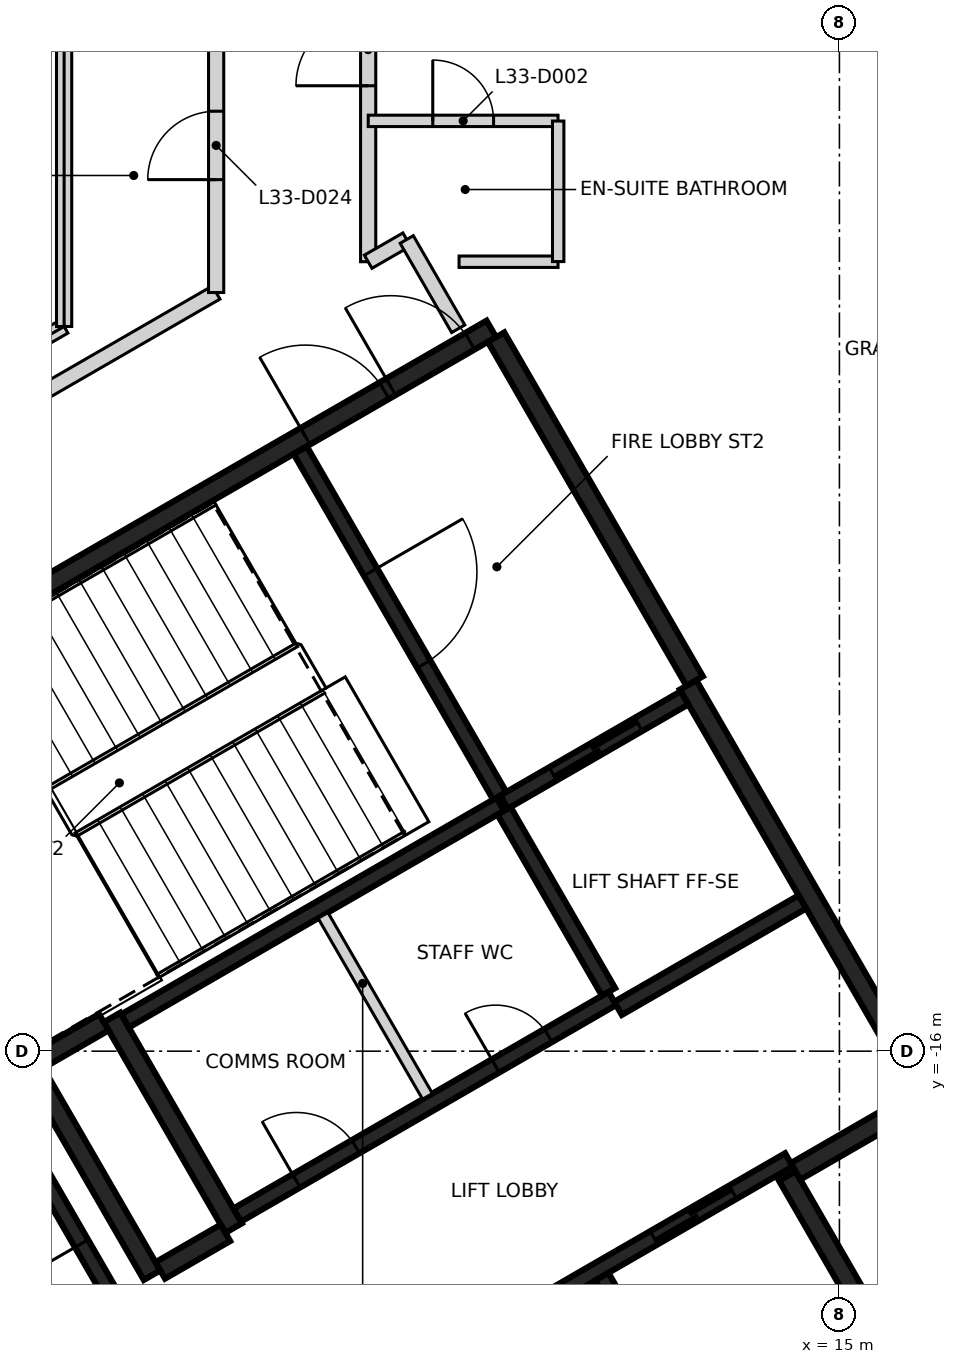
"""IFC4 building model, lengths in metres.
Left out: names, types, materials, properties, quantities, classifications, styles, units other than length and angle.
Written with IfcOpenShell. Run it as: python <this file> out.ifc"""

import sys

from ifc_helpers import new_model, si_unit, direction, frame, frame_2d, origin, place, context, subcontext, project, spatial, rectangle, extrude, element, fill, save


model = new_model("IFC4")
c1 = context("Model", 3, precision=1e-05, world=origin(), true_north=direction((0.0, 1.0)))
c2 = subcontext(c1, "Body", "Model", "MODEL_VIEW")
j1 = project(units=[si_unit("LENGTHUNIT", "METRE"), si_unit("PLANEANGLEUNIT", "RADIAN")], contexts=[c1])
p1 = place(None, origin())
s1 = spatial("IfcSite", under=j1, at=p1, CompositionType="ELEMENT")
p2 = place(p1, origin())
s2 = spatial("IfcBuilding", under=s1, at=p2, CompositionType="ELEMENT")
p3 = place(p2, frame((0.0, 0.0, 136.0)))
s3 = spatial("IfcBuildingStorey", under=s2, at=p3, CompositionType="ELEMENT", Elevation=136.0)
p4 = place(p3, frame((0.417, -12.273, 0.0), z_axis=(0.0, 0.0, 1.0), x_axis=(0.866021906294, 0.500006057782, 0.0)))
e1 = element("IfcWall", 1, at=p4, inside=s3, PredefinedType="SHEAR", context=c2, shape_type="SweptSolid", body=[
    extrude(rectangle(XDim=11.55, YDim=0.25, at=frame_2d((5.775, 0.0))), origin(), (0.0, 0.0, 1.0), 3.2),
])
p5 = place(p4, frame((10.025, 0.0, 0.0)))
e2 = element("IfcOpeningElement", 2, at=p5, cuts=e1, PredefinedType="OPENING", context=c2, shape_type="SweptSolid", body=[
    extrude(rectangle(XDim=1.2, YDim=2.1, at=frame_2d((0.6, 1.05))), frame((0.0, 0.135, 0.0), z_axis=(0.0, -1.0, 0.0), x_axis=(1.0, 0.0, 0.0)), (0.0, 0.0, 1.0), 0.27),
])
p6 = place(p4, frame((8.725, 0.0, 0.0)))
e3 = element("IfcOpeningElement", 3, at=p6, cuts=e1, PredefinedType="OPENING", context=c2, shape_type="SweptSolid", body=[
    extrude(rectangle(XDim=1.2, YDim=2.1, at=frame_2d((0.6, 1.05))), frame((0.0, 0.135, 0.0), z_axis=(0.0, -1.0, 0.0), x_axis=(1.0, 0.0, 0.0)), (0.0, 0.0, 1.0), 0.27),
])
p7 = place(p3, frame((13.008, -11.181, 0.0), z_axis=(0.0, 0.0, 1.0), x_axis=(0.500004234368, -0.866022959057, 0.0)))
e4 = element("IfcWall", 4, at=p7, inside=s3, PredefinedType="SHEAR", context=c2, shape_type="SweptSolid", body=[
    extrude(rectangle(XDim=6.25, YDim=0.25, at=frame_2d((3.125, 0.0))), origin(), (0.0, 0.0, 1.0), 3.2),
])
p8 = place(p3, frame((10.483, -6.606, 0.0), z_axis=(0.0, 0.0, 1.0), x_axis=(0.49999885962, -0.866026062182, 0.0)))
e5 = element("IfcWall", 5, at=p8, inside=s3, PredefinedType="SHEAR", context=c2, shape_type="SweptSolid", body=[
    extrude(rectangle(XDim=5.225, YDim=0.25, at=frame_2d((2.612, 0.0))), origin(), (0.0, 0.0, 1.0), 3.2),
])
p9 = place(p3, frame((7.031, -18.327, 0.0), z_axis=(0.0, 0.0, 1.0), x_axis=(-0.499971222258, 0.866042017984, 0.0)))
e6 = element("IfcWall", 6, at=p9, inside=s3, PredefinedType="SHEAR", context=c2, shape_type="SweptSolid", body=[
    extrude(rectangle(XDim=3.2, YDim=0.25, at=frame_2d((1.6, 0.0))), origin(), (0.0, 0.0, 1.0), 3.2),
])
p10 = place(p3, frame((14.315, -17.644, 0.0), z_axis=(0.0, 0.0, 1.0), x_axis=(0.500023226632, -0.866011993467, 0.0)))
e7 = element("IfcWall", 7, at=p10, inside=s3, PredefinedType="SHEAR", context=c2, shape_type="SweptSolid", body=[
    extrude(rectangle(XDim=2.974, YDim=0.25, at=frame_2d((1.487, 0.0))), origin(), (0.0, 0.0, 1.0), 3.2),
])
p11 = place(p3, frame((4.414, -16.276, 0.0), z_axis=(0.0, 0.0, 1.0), x_axis=(0.500003324108, -0.866023484601, 0.0)))
e8 = element("IfcWall", 8, at=p11, inside=s3, PredefinedType="SHEAR", context=c2, shape_type="SweptSolid", body=[
    extrude(rectangle(XDim=3.085, YDim=0.25, at=frame_2d((1.542, 0.0))), origin(), (0.0, 0.0, 1.0), 3.2),
])
p12 = place(p3, frame((5.322, -15.619, 0.0), z_axis=(0.0, 0.0, 1.0), x_axis=(-0.866026229868, -0.499998569178, 0.0)))
e9 = element("IfcWall", 9, at=p12, inside=s3, PredefinedType="SHEAR", context=c2, shape_type="SweptSolid", body=[
    extrude(rectangle(XDim=2.449, YDim=0.25, at=frame_2d((1.225, 0.0))), origin(), (0.0, 0.0, 1.0), 3.2),
])
p13 = place(p3, frame((16.025, -16.656, 0.0), z_axis=(0.0, 0.0, 1.0), x_axis=(-0.866016279763, -0.500015802937, 0.0)))
e10 = element("IfcWall", 10, at=p13, inside=s3, PredefinedType="SHEAR", context=c2, shape_type="SweptSolid", body=[
    extrude(rectangle(XDim=1.849, YDim=0.25, at=frame_2d((0.925, 0.0))), origin(), (0.0, 0.0, 1.0), 3.2),
])
p14 = place(p3, frame((6.065, -18.885, 0.0), z_axis=(0.0, 0.0, 1.0), x_axis=(0.866017078145, 0.500014420154, 0.0)))
e11 = element("IfcWall", 11, at=p14, inside=s3, PredefinedType="SHEAR", context=c2, shape_type="SweptSolid", body=[
    extrude(rectangle(XDim=0.989, YDim=0.25, at=frame_2d((0.495, 0.0))), origin(), (0.0, 0.0, 1.0), 3.2),
])
p15 = place(p3, frame((9.052, -20.48, 0.0), z_axis=(0.0, 0.0, 1.0), x_axis=(0.866030299012, 0.499991521122, 0.0)))
e12 = element("IfcWall", 12, at=p15, inside=s3, PredefinedType="SHEAR", context=c2, shape_type="SweptSolid", body=[
    extrude(rectangle(XDim=6.1, YDim=0.2, at=frame_2d((3.05, 0.0))), origin(), (0.0, 0.0, 1.0), 3.2),
])
p16 = place(p15, frame((1.0, 0.0, 0.0)))
e13 = element("IfcOpeningElement", 13, at=p16, cuts=e12, PredefinedType="OPENING", context=c2, shape_type="SweptSolid", body=[
    extrude(rectangle(XDim=1.2, YDim=2.1, at=frame_2d((0.6, 1.05))), frame((0.0, 0.11, 0.0), z_axis=(0.0, -1.0, 0.0), x_axis=(1.0, 0.0, 0.0)), (0.0, 0.0, 1.0), 0.22),
])
p17 = place(p15, frame((4.05, 0.0, 0.0)))
e14 = element("IfcOpeningElement", 14, at=p17, cuts=e12, PredefinedType="OPENING", context=c2, shape_type="SweptSolid", body=[
    extrude(rectangle(XDim=1.2, YDim=2.1, at=frame_2d((0.6, 1.05))), frame((0.0, 0.11, 0.0), z_axis=(0.0, -1.0, 0.0), x_axis=(1.0, 0.0, 0.0)), (0.0, 0.0, 1.0), 0.22),
])
p18 = place(p3, frame((10.538, -12.752, 0.0), z_axis=(0.0, 0.0, 1.0), x_axis=(-0.866038630372, -0.499977090179, 0.0)))
e15 = element("IfcWall", 15, at=p18, inside=s3, PredefinedType="SHEAR", context=c2, shape_type="SweptSolid", body=[
    extrude(rectangle(XDim=5.699, YDim=0.2, at=frame_2d((2.85, 0.0))), origin(), (0.0, 0.0, 1.0), 3.2),
])
p19 = place(p3, frame((7.077, -18.156, 0.0), z_axis=(0.0, 0.0, 1.0), x_axis=(0.866038630372, 0.499977090179, 0.0)))
e16 = element("IfcWall", 16, at=p19, inside=s3, PredefinedType="SHEAR", context=c2, shape_type="SweptSolid", body=[
    extrude(rectangle(XDim=5.699, YDim=0.2, at=frame_2d((2.85, 0.0))), origin(), (0.0, 0.0, 1.0), 3.2),
])
p20 = place(p19, frame((0.899, 0.0, 0.0)))
e17 = element("IfcOpeningElement", 17, at=p20, cuts=e16, PredefinedType="OPENING", context=c2, shape_type="SweptSolid", body=[
    extrude(rectangle(XDim=0.9, YDim=2.1, at=frame_2d((0.45, 1.05))), frame((0.0, 0.11, 0.0), z_axis=(0.0, -1.0, 0.0), x_axis=(1.0, 0.0, 0.0)), (0.0, 0.0, 1.0), 0.22),
])
p21 = place(p19, frame((3.924, 0.0, 0.0)))
e18 = element("IfcOpeningElement", 18, at=p21, cuts=e16, PredefinedType="OPENING", context=c2, shape_type="SweptSolid", body=[
    extrude(rectangle(XDim=0.8, YDim=2.1, at=frame_2d((0.4, 1.05))), frame((0.0, 0.11, 0.0), z_axis=(0.0, -1.0, 0.0), x_axis=(1.0, 0.0, 0.0)), (0.0, 0.0, 1.0), 0.22),
])
p22 = place(p3, frame((7.906, -8.094, 0.0), z_axis=(0.0, 0.0, 1.0), x_axis=(0.500024287448, -0.866011380966, 0.0)))
e19 = element("IfcWall", 19, at=p22, inside=s3, PredefinedType="SHEAR", context=c2, shape_type="SweptSolid", body=[
    extrude(rectangle(XDim=5.251, YDim=0.2, at=frame_2d((2.625, 0.0))), origin(), (0.0, 0.0, 1.0), 3.2),
])
p23 = place(p22, frame((1.849, 0.0, 0.0)))
e20 = element("IfcOpeningElement", 20, at=p23, cuts=e19, PredefinedType="OPENING", context=c2, shape_type="SweptSolid", body=[
    extrude(rectangle(XDim=1.4, YDim=2.1, at=frame_2d((0.7, 1.05))), frame((0.0, 0.11, 0.0), z_axis=(0.0, -1.0, 0.0), x_axis=(1.0, 0.0, 0.0)), (0.0, 0.0, 1.0), 0.22),
])
p24 = place(p3, frame((11.875, -18.967, 0.0), z_axis=(0.0, 0.0, 1.0), x_axis=(0.49998131003, -0.866036194175, 0.0)))
e21 = element("IfcWall", 21, at=p24, inside=s3, PredefinedType="SHEAR", context=c2, shape_type="SweptSolid", body=[
    extrude(rectangle(XDim=3.048, YDim=0.2, at=frame_2d((1.524, 0.0))), origin(), (0.0, 0.0, 1.0), 3.2),
])
p25 = place(p3, frame((5.503, -19.352, 0.0), z_axis=(0.0, 0.0, 1.0), x_axis=(-0.499986818241, 0.866033014143, 0.0)))
e22 = element("IfcWall", 22, at=p25, inside=s3, PredefinedType="SHEAR", context=c2, shape_type="SweptSolid", body=[
    extrude(rectangle(XDim=2.798, YDim=0.2, at=frame_2d((1.399, 0.0))), origin(), (0.0, 0.0, 1.0), 3.2),
])
p26 = place(p25, frame((0.949, 0.0, 0.0)))
e23 = element("IfcOpeningElement", 23, at=p26, cuts=e22, PredefinedType="OPENING", context=c2, shape_type="SweptSolid", body=[
    extrude(rectangle(XDim=0.9, YDim=2.1, at=frame_2d((0.45, 1.05))), frame((0.0, 0.11, 0.0), z_axis=(0.0, -1.0, 0.0), x_axis=(1.0, 0.0, 0.0)), (0.0, 0.0, 1.0), 0.22),
])
p27 = place(p3, frame((11.963, -15.22, 0.0), z_axis=(0.0, 0.0, 1.0), x_axis=(-0.500034990121, 0.866005201286, 0.0)))
e24 = element("IfcWall", 24, at=p27, inside=s3, PredefinedType="SHEAR", context=c2, shape_type="SweptSolid", body=[
    extrude(rectangle(XDim=2.75, YDim=0.2, at=frame_2d((1.375, 0.0))), origin(), (0.0, 0.0, 1.0), 3.2),
])
p28 = place(p3, frame((10.587, -12.723, 0.0), z_axis=(0.0, 0.0, 1.0), x_axis=(0.866037306777, 0.499979382845, 0.0)))
e25 = element("IfcWall", 25, at=p28, inside=s3, PredefinedType="SHEAR", context=c2, shape_type="SweptSolid", body=[
    extrude(rectangle(XDim=2.742, YDim=0.2, at=frame_2d((1.371, 0.0))), origin(), (0.0, 0.0, 1.0), 3.2),
])
p29 = place(p28, frame((0.743, 0.0, 0.0)))
e26 = element("IfcOpeningElement", 26, at=p29, cuts=e25, PredefinedType="OPENING", context=c2, shape_type="SweptSolid", body=[
    extrude(rectangle(XDim=1.3, YDim=2.1, at=frame_2d((0.65, 1.05))), frame((0.0, 0.11, 0.0), z_axis=(0.0, -1.0, 0.0), x_axis=(1.0, 0.0, 0.0)), (0.0, 0.0, 1.0), 0.22),
])
p30 = place(p3, frame((14.512, -14.037, 0.0), z_axis=(0.0, 0.0, 1.0), x_axis=(-0.866044696403, -0.499966582715, 0.0)))
e27 = element("IfcWall", 27, at=p30, inside=s3, PredefinedType="SHEAR", context=c2, shape_type="SweptSolid", body=[
    extrude(rectangle(XDim=2.799, YDim=0.2, at=frame_2d((1.399, 0.0))), origin(), (0.0, 0.0, 1.0), 3.2),
])
p31 = place(p3, frame((8.207, -14.214, 0.0), z_axis=(0.0, 0.0, 1.0), x_axis=(0.50002746344, -0.86600954718, 0.0)))
e28 = element("IfcWall", 28, at=p31, inside=s3, PredefinedType="PARTITIONING", context=c2, shape_type="SweptSolid", body=[
    extrude(rectangle(XDim=2.748, YDim=0.15, at=frame_2d((1.374, 0.0))), origin(), (0.0, 0.0, 1.0), 3.2),
])
p32 = place(p3, frame((4.297, -7.464, 0.0), z_axis=(0.0, 0.0, 1.0), x_axis=(0.86602521942, 0.500000319328, 0.0)))
e29 = element("IfcWall", 29, at=p32, inside=s3, PredefinedType="PARTITIONING", context=c2, shape_type="SweptSolid", body=[
    extrude(rectangle(XDim=2.89, YDim=0.2, at=frame_2d((1.445, 0.0))), origin(), (0.0, 0.0, 1.0), 2.3),
])
p33 = place(p3, frame((6.8, -6.019, 0.0), z_axis=(0.0, 0.0, 1.0), x_axis=(0.0, 1.0, 0.0)))
e30 = element("IfcWall", 30, at=p33, inside=s3, PredefinedType="PARTITIONING", context=c2, shape_type="SweptSolid", body=[
    extrude(rectangle(XDim=12.038, YDim=0.2, at=frame_2d((6.019, 0.0))), origin(), (0.0, 0.0, 1.0), 3.2),
])
p34 = place(p33, frame((1.485, 0.0, 0.0)))
e31 = element("IfcOpeningElement", 31, at=p34, cuts=e30, PredefinedType="OPENING", context=c2, shape_type="SweptSolid", body=[
    extrude(rectangle(XDim=0.9, YDim=2.1, at=frame_2d((0.45, 1.05))), frame((0.0, 0.11, 0.0), z_axis=(0.0, -1.0, 0.0), x_axis=(1.0, 0.0, 0.0)), (0.0, 0.0, 1.0), 0.22),
])
p35 = place(p33, frame((7.492, 0.0, 0.0)))
e32 = element("IfcOpeningElement", 32, at=p35, cuts=e30, PredefinedType="OPENING", context=c2, shape_type="SweptSolid", body=[
    extrude(rectangle(XDim=0.9, YDim=2.1, at=frame_2d((0.45, 1.05))), frame((0.0, 0.11, 0.0), z_axis=(0.0, -1.0, 0.0), x_axis=(1.0, 0.0, 0.0)), (0.0, 0.0, 1.0), 0.22),
])
p36 = place(p3, frame((8.8, -5.614, 0.0), z_axis=(0.0, 0.0, 1.0), x_axis=(0.0, 1.0, 0.0)))
e33 = element("IfcWall", 33, at=p36, inside=s3, PredefinedType="PARTITIONING", context=c2, shape_type="SweptSolid", body=[
    extrude(rectangle(XDim=9.692, YDim=0.2, at=frame_2d((4.846, 0.0))), origin(), (0.0, 0.0, 1.0), 3.2),
])
p37 = place(p36, frame((2.315, 0.0, 0.0)))
e34 = element("IfcOpeningElement", 34, at=p37, cuts=e33, PredefinedType="OPENING", context=c2, shape_type="SweptSolid", body=[
    extrude(rectangle(XDim=0.95, YDim=2.1, at=frame_2d((0.475, 1.05))), frame((0.0, 0.11, 0.0), z_axis=(0.0, -1.0, 0.0), x_axis=(1.0, 0.0, 0.0)), (0.0, 0.0, 1.0), 0.22),
])
p38 = place(p36, frame((5.114, 0.0, 0.0)))
e35 = element("IfcOpeningElement", 35, at=p38, cuts=e33, PredefinedType="OPENING", context=c2, shape_type="SweptSolid", body=[
    extrude(rectangle(XDim=1.0, YDim=2.1, at=frame_2d((0.5, 1.05))), frame((0.0, 0.11, 0.0), z_axis=(0.0, -1.0, 0.0), x_axis=(1.0, 0.0, 0.0)), (0.0, 0.0, 1.0), 0.22),
])
p39 = place(p3, frame((8.8, -5.614, 0.0), z_axis=(0.0, 0.0, 1.0), x_axis=(0.866491166515, 0.499192406143, 0.0)))
e36 = element("IfcWall", 36, at=p39, inside=s3, PredefinedType="PARTITIONING", context=c2, shape_type="SweptSolid", body=[
    extrude(rectangle(XDim=0.585, YDim=0.2, at=frame_2d((0.292, 0.0))), origin(), (0.0, 0.0, 1.0), 3.2),
])
p40 = place(p3, frame((9.308, -5.322, 0.0), z_axis=(0.0, 0.0, 1.0), x_axis=(0.499644515495, -0.866230545603, 0.0)))
e37 = element("IfcWall", 37, at=p40, inside=s3, PredefinedType="PARTITIONING", context=c2, shape_type="SweptSolid", body=[
    extrude(rectangle(XDim=1.356, YDim=0.2, at=frame_2d((0.678, 0.0))), origin(), (0.0, 0.0, 1.0), 3.2),
])
p41 = place(p3, frame((3.99, -6.934, 0.0), z_axis=(0.0, 0.0, 1.0), x_axis=(0.865872609263, 0.500264554538, 0.0)))
e38 = element("IfcWall", 38, at=p41, inside=s3, PredefinedType="PARTITIONING", context=c2, shape_type="SweptSolid", body=[
    extrude(rectangle(XDim=0.936, YDim=0.2, at=frame_2d((0.468, 0.0))), origin(), (0.0, 0.0, 1.0), 2.3),
])
p42 = place(p3, frame((4.8, -6.466, 0.0), z_axis=(0.0, 0.0, 1.0), x_axis=(0.0, 1.0, 0.0)))
e39 = element("IfcWall", 39, at=p42, inside=s3, PredefinedType="PARTITIONING", context=c2, shape_type="SweptSolid", body=[
    extrude(rectangle(XDim=12.932, YDim=0.2, at=frame_2d((6.466, 0.0))), origin(), (0.0, 0.0, 1.0), 2.3),
])
p43 = place(p3, frame((8.801, -3.761, 0.0), z_axis=(0.0, 0.0, 1.0), x_axis=(1.0, 0.0, 0.0)))
e40 = element("IfcWall", 40, at=p43, inside=s3, PredefinedType="PARTITIONING", context=c2, shape_type="SweptSolid", body=[
    extrude(rectangle(XDim=2.497, YDim=0.15, at=frame_2d((1.249, 0.0))), origin(), (0.0, 0.0, 1.0), 3.2),
])
p44 = place(p43, frame((0.849, 0.0, 0.0)))
e41 = element("IfcOpeningElement", 41, at=p44, cuts=e40, PredefinedType="OPENING", context=c2, shape_type="SweptSolid", body=[
    extrude(rectangle(XDim=0.8, YDim=2.1, at=frame_2d((0.4, 1.05))), frame((0.0, 0.085, 0.0), z_axis=(0.0, -1.0, 0.0), x_axis=(1.0, 0.0, 0.0)), (0.0, 0.0, 1.0), 0.17),
])
p45 = place(p3, frame((11.298, -5.614, 0.0), z_axis=(0.0, 0.0, 1.0), x_axis=(-1.0, 0.0, 0.0)))
e42 = element("IfcWall", 42, at=p45, inside=s3, PredefinedType="PARTITIONING", context=c2, shape_type="SweptSolid", body=[
    extrude(rectangle(XDim=1.302, YDim=0.15, at=frame_2d((0.651, 0.0))), origin(), (0.0, 0.0, 1.0), 3.2),
])
p46 = place(p3, frame((11.3, -5.612, 0.0), z_axis=(0.0, 0.0, 1.0), x_axis=(0.0, 1.0, 0.0)))
e43 = element("IfcWall", 43, at=p46, inside=s3, PredefinedType="PARTITIONING", context=c2, shape_type="SweptSolid", body=[
    extrude(rectangle(XDim=1.849, YDim=0.15, at=frame_2d((0.925, 0.0))), origin(), (0.0, 0.0, 1.0), 3.2),
])
p47 = place(p29, origin())
e44 = element("IfcDoor", 44, at=p47, inside=s3, OperationType="SLIDING_TO_RIGHT", PredefinedType="DOOR", context=c2, shape_type="SweptSolid", body=[
    extrude(rectangle(XDim=1.3, YDim=2.1, at=frame_2d((0.65, 1.05))), frame((0.0, 0.025, 0.0), z_axis=(0.0, -1.0, 0.0), x_axis=(1.0, 0.0, 0.0)), (0.0, 0.0, 1.0), 0.05),
])
fill(e26, e44)
p48 = place(p17, origin())
e45 = element("IfcDoor", 45, at=p48, inside=s3, OperationType="DOUBLE_DOOR_SLIDING", PredefinedType="DOOR", context=c2, shape_type="SweptSolid", body=[
    extrude(rectangle(XDim=1.2, YDim=2.1, at=frame_2d((0.6, 1.05))), frame((0.0, 0.025, 0.0), z_axis=(0.0, -1.0, 0.0), x_axis=(1.0, 0.0, 0.0)), (0.0, 0.0, 1.0), 0.05),
])
fill(e14, e45)
p49 = place(p5, origin())
e46 = element("IfcDoor", 46, at=p49, inside=s3, OperationType="SINGLE_SWING_LEFT", PredefinedType="DOOR", context=c2, shape_type="SweptSolid", body=[
    extrude(rectangle(XDim=1.2, YDim=2.1, at=frame_2d((0.6, 1.05))), frame((0.0, 0.025, 0.0), z_axis=(0.0, -1.0, 0.0), x_axis=(1.0, 0.0, 0.0)), (0.0, 0.0, 1.0), 0.05),
])
fill(e2, e46)
p50 = place(p6, origin())
e47 = element("IfcDoor", 47, at=p50, inside=s3, OperationType="SINGLE_SWING_RIGHT", PredefinedType="DOOR", context=c2, shape_type="SweptSolid", body=[
    extrude(rectangle(XDim=1.2, YDim=2.1, at=frame_2d((0.6, 1.05))), frame((0.0, 0.025, 0.0), z_axis=(0.0, -1.0, 0.0), x_axis=(1.0, 0.0, 0.0)), (0.0, 0.0, 1.0), 0.05),
])
fill(e3, e47)
p51 = place(p23, origin())
e48 = element("IfcDoor", 48, at=p51, inside=s3, OperationType="SINGLE_SWING_RIGHT", PredefinedType="DOOR", context=c2, shape_type="SweptSolid", body=[
    extrude(rectangle(XDim=1.4, YDim=2.1, at=frame_2d((0.7, 1.05))), frame((0.0, 0.025, 0.0), z_axis=(0.0, -1.0, 0.0), x_axis=(1.0, 0.0, 0.0)), (0.0, 0.0, 1.0), 0.05),
])
fill(e20, e48)
p52 = place(p20, origin())
e49 = element("IfcDoor", 49, at=p52, inside=s3, OperationType="SINGLE_SWING_LEFT", PredefinedType="DOOR", context=c2, shape_type="SweptSolid", body=[
    extrude(rectangle(XDim=0.9, YDim=2.1, at=frame_2d((0.45, 1.05))), frame((0.0, 0.025, 0.0), z_axis=(0.0, -1.0, 0.0), x_axis=(1.0, 0.0, 0.0)), (0.0, 0.0, 1.0), 0.05),
])
fill(e17, e49)
p53 = place(p21, origin())
e50 = element("IfcDoor", 50, at=p53, inside=s3, OperationType="SINGLE_SWING_RIGHT", PredefinedType="DOOR", context=c2, shape_type="SweptSolid", body=[
    extrude(rectangle(XDim=0.8, YDim=2.1, at=frame_2d((0.4, 1.05))), frame((0.0, 0.025, 0.0), z_axis=(0.0, -1.0, 0.0), x_axis=(1.0, 0.0, 0.0)), (0.0, 0.0, 1.0), 0.05),
])
fill(e18, e50)
p54 = place(p26, origin())
e51 = element("IfcDoor", 51, at=p54, inside=s3, OperationType="SINGLE_SWING_LEFT", PredefinedType="DOOR", context=c2, shape_type="SweptSolid", body=[
    extrude(rectangle(XDim=0.9, YDim=2.1, at=frame_2d((0.45, 1.05))), frame((0.0, 0.025, 0.0), z_axis=(0.0, -1.0, 0.0), x_axis=(1.0, 0.0, 0.0)), (0.0, 0.0, 1.0), 0.05),
])
fill(e23, e51)
p55 = place(p37, frame((0.95, 0.0, 0.0), z_axis=(0.0, 0.0, 1.0), x_axis=(-1.0, 0.0, 0.0)))
e52 = element("IfcDoor", 52, at=p55, inside=s3, OperationType="SINGLE_SWING_LEFT", PredefinedType="DOOR", context=c2, shape_type="SweptSolid", body=[
    extrude(rectangle(XDim=0.95, YDim=2.1, at=frame_2d((0.475, 1.05))), frame((0.0, 0.025, 0.0), z_axis=(0.0, -1.0, 0.0), x_axis=(1.0, 0.0, 0.0)), (0.0, 0.0, 1.0), 0.05),
])
fill(e34, e52)
p56 = place(p44, frame((0.8, 0.0, 0.0), z_axis=(0.0, 0.0, 1.0), x_axis=(-1.0, 0.0, 0.0)))
e53 = element("IfcDoor", 53, at=p56, inside=s3, OperationType="SINGLE_SWING_LEFT", PredefinedType="DOOR", context=c2, shape_type="SweptSolid", body=[
    extrude(rectangle(XDim=0.8, YDim=2.1, at=frame_2d((0.4, 1.05))), frame((0.0, 0.025, 0.0), z_axis=(0.0, -1.0, 0.0), x_axis=(1.0, 0.0, 0.0)), (0.0, 0.0, 1.0), 0.05),
])
fill(e41, e53)
p57 = place(p34, origin())
e54 = element("IfcDoor", 54, at=p57, inside=s3, OperationType="SINGLE_SWING_LEFT", PredefinedType="DOOR", context=c2, shape_type="SweptSolid", body=[
    extrude(rectangle(XDim=0.9, YDim=2.1, at=frame_2d((0.45, 1.05))), frame((0.0, 0.025, 0.0), z_axis=(0.0, -1.0, 0.0), x_axis=(1.0, 0.0, 0.0)), (0.0, 0.0, 1.0), 0.05),
])
fill(e31, e54)
save(model, sys.argv[1])
